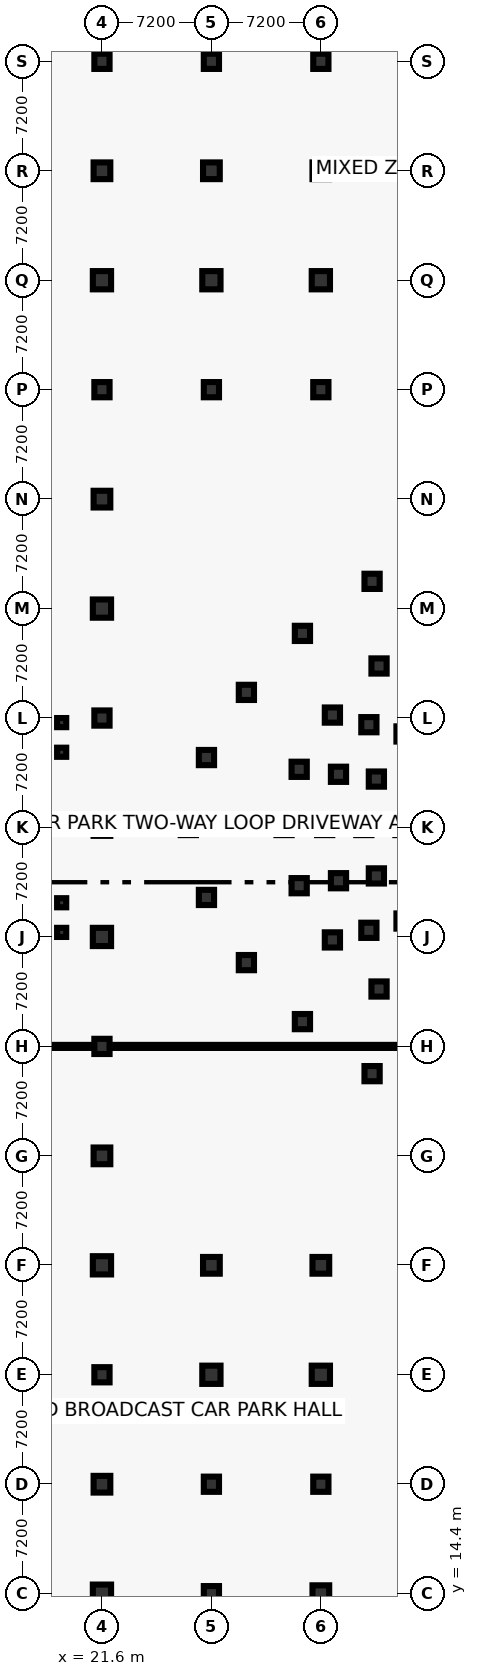
"""IFC4 building model, lengths in metres.
Left out: names, types, materials, properties, quantities, classifications, styles, units other than length and angle.
Written with IfcOpenShell. Run it as: python <this file> out.ifc"""

import sys

from ifc_helpers import new_model, si_unit, direction, frame, frame_2d, origin, origin_2d, place, context, subcontext, project, spatial, rectangle, circle, extrude, element, save


model = new_model("IFC4")
c1 = context("Model", 3, precision=1e-05, world=origin(), true_north=direction((0.0, 1.0)))
c2 = subcontext(c1, "Body", "Model", "MODEL_VIEW")
j1 = project(units=[si_unit("LENGTHUNIT", "METRE"), si_unit("PLANEANGLEUNIT", "RADIAN")], contexts=[c1])
p1 = place(None, origin())
s1 = spatial("IfcSite", under=j1, at=p1, CompositionType="ELEMENT")
p2 = place(p1, origin())
s2 = spatial("IfcBuilding", under=s1, at=p2, CompositionType="ELEMENT")
p3 = place(p2, frame((0.0, 0.0, -5.4)))
s3 = spatial("IfcBuildingStorey", under=s2, at=p3, CompositionType="ELEMENT", Elevation=-5.4)
p4 = place(p3, frame((21.6, 14.4, 0.0), z_axis=(0.0, 0.0, 1.0), x_axis=(1.0, 0.0, 0.0)))
e1 = element("IfcColumn", 1, at=p4, inside=s3, PredefinedType="COLUMN", context=c2, shape_type="SweptSolid", body=[
    extrude(circle(Radius=0.6, at=origin_2d()), origin(), (0.0, 0.0, 1.0), 5.4),
])
p5 = place(p3, frame((21.6, 21.6, 0.0), z_axis=(0.0, 0.0, 1.0), x_axis=(1.0, 0.0, 0.0)))
e2 = element("IfcColumn", 2, at=p5, inside=s3, PredefinedType="COLUMN", context=c2, shape_type="SweptSolid", body=[
    extrude(rectangle(XDim=1.1, YDim=1.1, at=origin_2d()), origin(), (0.0, 0.0, 1.0), 5.4),
])
p6 = place(p3, frame((21.6, 28.8, 0.0), z_axis=(0.0, 0.0, 1.0), x_axis=(1.0, 0.0, 0.0)))
e3 = element("IfcColumn", 3, at=p6, inside=s3, PredefinedType="COLUMN", context=c2, shape_type="SweptSolid", body=[
    extrude(rectangle(XDim=1.0, YDim=1.0, at=origin_2d()), origin(), (0.0, 0.0, 1.0), 5.4),
])
p7 = place(p3, frame((21.6, 36.0, 0.0), z_axis=(0.0, 0.0, 1.0), x_axis=(1.0, 0.0, 0.0)))
e4 = element("IfcColumn", 4, at=p7, inside=s3, PredefinedType="COLUMN", context=c2, shape_type="SweptSolid", body=[
    extrude(circle(Radius=0.6, at=origin_2d()), origin(), (0.0, 0.0, 1.0), 5.4),
])
p8 = place(p3, frame((21.6, 43.2, 0.0), z_axis=(0.0, 0.0, 1.0), x_axis=(1.0, 0.0, 0.0)))
e5 = element("IfcColumn", 5, at=p8, inside=s3, PredefinedType="COLUMN", context=c2, shape_type="SweptSolid", body=[
    extrude(rectangle(XDim=1.1, YDim=1.1, at=origin_2d()), origin(), (0.0, 0.0, 1.0), 5.4),
])
p9 = place(p3, frame((21.6, 50.4, 0.0), z_axis=(0.0, 0.0, 1.0), x_axis=(1.0, 0.0, 0.0)))
e6 = element("IfcColumn", 6, at=p9, inside=s3, PredefinedType="COLUMN", context=c2, shape_type="SweptSolid", body=[
    extrude(rectangle(XDim=1.0, YDim=1.0, at=origin_2d()), origin(), (0.0, 0.0, 1.0), 5.4),
])
p10 = place(p3, frame((21.6, 57.6, 0.0), z_axis=(0.0, 0.0, 1.0), x_axis=(1.0, 0.0, 0.0)))
e7 = element("IfcColumn", 7, at=p10, inside=s3, PredefinedType="COLUMN", context=c2, shape_type="SweptSolid", body=[
    extrude(circle(Radius=0.6, at=origin_2d()), origin(), (0.0, 0.0, 1.0), 5.4),
])
p11 = place(p3, frame((21.6, 64.8, 0.0), z_axis=(0.0, 0.0, 1.0), x_axis=(1.0, 0.0, 0.0)))
e8 = element("IfcColumn", 8, at=p11, inside=s3, PredefinedType="COLUMN", context=c2, shape_type="SweptSolid", body=[
    extrude(rectangle(XDim=1.1, YDim=1.1, at=origin_2d()), origin(), (0.0, 0.0, 1.0), 5.4),
])
p12 = place(p3, frame((21.6, 72.0, 0.0), z_axis=(0.0, 0.0, 1.0), x_axis=(1.0, 0.0, 0.0)))
e9 = element("IfcColumn", 9, at=p12, inside=s3, PredefinedType="COLUMN", context=c2, shape_type="SweptSolid", body=[
    extrude(rectangle(XDim=1.0, YDim=1.0, at=origin_2d()), origin(), (0.0, 0.0, 1.0), 5.4),
])
p13 = place(p3, frame((21.6, 79.2, 0.0), z_axis=(0.0, 0.0, 1.0), x_axis=(1.0, 0.0, 0.0)))
e10 = element("IfcColumn", 10, at=p13, inside=s3, PredefinedType="COLUMN", context=c2, shape_type="SweptSolid", body=[
    extrude(circle(Radius=0.6, at=origin_2d()), origin(), (0.0, 0.0, 1.0), 5.4),
])
p14 = place(p3, frame((21.6, 86.4, 0.0), z_axis=(0.0, 0.0, 1.0), x_axis=(1.0, 0.0, 0.0)))
e11 = element("IfcColumn", 11, at=p14, inside=s3, PredefinedType="COLUMN", context=c2, shape_type="SweptSolid", body=[
    extrude(rectangle(XDim=1.1, YDim=1.1, at=origin_2d()), origin(), (0.0, 0.0, 1.0), 5.4),
])
p15 = place(p3, frame((21.6, 93.6, 0.0), z_axis=(0.0, 0.0, 1.0), x_axis=(1.0, 0.0, 0.0)))
e12 = element("IfcColumn", 12, at=p15, inside=s3, PredefinedType="COLUMN", context=c2, shape_type="SweptSolid", body=[
    extrude(rectangle(XDim=1.0, YDim=1.0, at=origin_2d()), origin(), (0.0, 0.0, 1.0), 5.4),
])
p16 = place(p3, frame((21.6, 100.8, 0.0), z_axis=(0.0, 0.0, 1.0), x_axis=(1.0, 0.0, 0.0)))
e13 = element("IfcColumn", 13, at=p16, inside=s3, PredefinedType="COLUMN", context=c2, shape_type="SweptSolid", body=[
    extrude(circle(Radius=0.6, at=origin_2d()), origin(), (0.0, 0.0, 1.0), 5.4),
])
p17 = place(p3, frame((21.6, 108.0, 0.0), z_axis=(0.0, 0.0, 1.0), x_axis=(1.0, 0.0, 0.0)))
e14 = element("IfcColumn", 14, at=p17, inside=s3, PredefinedType="COLUMN", context=c2, shape_type="SweptSolid", body=[
    extrude(rectangle(XDim=1.1, YDim=1.1, at=origin_2d()), origin(), (0.0, 0.0, 1.0), 5.4),
])
p18 = place(p3, frame((21.6, 115.2, 0.0), z_axis=(0.0, 0.0, 1.0), x_axis=(1.0, 0.0, 0.0)))
e15 = element("IfcColumn", 15, at=p18, inside=s3, PredefinedType="COLUMN", context=c2, shape_type="SweptSolid", body=[
    extrude(rectangle(XDim=1.0, YDim=1.0, at=origin_2d()), origin(), (0.0, 0.0, 1.0), 5.4),
])
p19 = place(p3, frame((28.8, 14.4, 0.0), z_axis=(0.0, 0.0, 1.0), x_axis=(1.0, 0.0, 0.0)))
e16 = element("IfcColumn", 16, at=p19, inside=s3, PredefinedType="COLUMN", context=c2, shape_type="SweptSolid", body=[
    extrude(circle(Radius=0.5, at=origin_2d()), origin(), (0.0, 0.0, 1.0), 5.4),
])
p20 = place(p3, frame((28.8, 21.6, 0.0), z_axis=(0.0, 0.0, 1.0), x_axis=(1.0, 0.0, 0.0)))
e17 = element("IfcColumn", 17, at=p20, inside=s3, PredefinedType="COLUMN", context=c2, shape_type="SweptSolid", body=[
    extrude(rectangle(XDim=1.0, YDim=1.0, at=origin_2d()), origin(), (0.0, 0.0, 1.0), 5.4),
])
p21 = place(p3, frame((28.8, 28.8, 0.0), z_axis=(0.0, 0.0, 1.0), x_axis=(1.0, 0.0, 0.0)))
e18 = element("IfcColumn", 18, at=p21, inside=s3, PredefinedType="COLUMN", context=c2, shape_type="SweptSolid", body=[
    extrude(circle(Radius=0.6, at=origin_2d()), origin(), (0.0, 0.0, 1.0), 5.4),
])
p22 = place(p3, frame((28.8, 36.0, 0.0), z_axis=(0.0, 0.0, 1.0), x_axis=(1.0, 0.0, 0.0)))
e19 = element("IfcColumn", 19, at=p22, inside=s3, PredefinedType="COLUMN", context=c2, shape_type="SweptSolid", body=[
    extrude(rectangle(XDim=1.1, YDim=1.1, at=origin_2d()), origin(), (0.0, 0.0, 1.0), 5.4),
])
p23 = place(p3, frame((28.8, 93.6, 0.0), z_axis=(0.0, 0.0, 1.0), x_axis=(1.0, 0.0, 0.0)))
e20 = element("IfcColumn", 20, at=p23, inside=s3, PredefinedType="COLUMN", context=c2, shape_type="SweptSolid", body=[
    extrude(rectangle(XDim=1.0, YDim=1.0, at=origin_2d()), origin(), (0.0, 0.0, 1.0), 5.4),
])
p24 = place(p3, frame((28.8, 100.8, 0.0), z_axis=(0.0, 0.0, 1.0), x_axis=(1.0, 0.0, 0.0)))
e21 = element("IfcColumn", 21, at=p24, inside=s3, PredefinedType="COLUMN", context=c2, shape_type="SweptSolid", body=[
    extrude(circle(Radius=0.6, at=origin_2d()), origin(), (0.0, 0.0, 1.0), 5.4),
])
p25 = place(p3, frame((28.8, 108.0, 0.0), z_axis=(0.0, 0.0, 1.0), x_axis=(1.0, 0.0, 0.0)))
e22 = element("IfcColumn", 22, at=p25, inside=s3, PredefinedType="COLUMN", context=c2, shape_type="SweptSolid", body=[
    extrude(rectangle(XDim=1.1, YDim=1.1, at=origin_2d()), origin(), (0.0, 0.0, 1.0), 5.4),
])
p26 = place(p3, frame((28.8, 115.2, 0.0), z_axis=(0.0, 0.0, 1.0), x_axis=(1.0, 0.0, 0.0)))
e23 = element("IfcColumn", 23, at=p26, inside=s3, PredefinedType="COLUMN", context=c2, shape_type="SweptSolid", body=[
    extrude(circle(Radius=0.5, at=origin_2d()), origin(), (0.0, 0.0, 1.0), 5.4),
])
p27 = place(p3, frame((36.0, 14.4, 0.0), z_axis=(0.0, 0.0, 1.0), x_axis=(1.0, 0.0, 0.0)))
e24 = element("IfcColumn", 24, at=p27, inside=s3, PredefinedType="COLUMN", context=c2, shape_type="SweptSolid", body=[
    extrude(rectangle(XDim=1.1, YDim=1.1, at=origin_2d()), origin(), (0.0, 0.0, 1.0), 5.4),
])
p28 = place(p3, frame((36.0, 21.6, 0.0), z_axis=(0.0, 0.0, 1.0), x_axis=(1.0, 0.0, 0.0)))
e25 = element("IfcColumn", 25, at=p28, inside=s3, PredefinedType="COLUMN", context=c2, shape_type="SweptSolid", body=[
    extrude(rectangle(XDim=1.0, YDim=1.0, at=origin_2d()), origin(), (0.0, 0.0, 1.0), 5.4),
])
p29 = place(p3, frame((36.0, 28.8, 0.0), z_axis=(0.0, 0.0, 1.0), x_axis=(1.0, 0.0, 0.0)))
e26 = element("IfcColumn", 26, at=p29, inside=s3, PredefinedType="COLUMN", context=c2, shape_type="SweptSolid", body=[
    extrude(circle(Radius=0.6, at=origin_2d()), origin(), (0.0, 0.0, 1.0), 5.4),
])
p30 = place(p3, frame((36.0, 36.0, 0.0), z_axis=(0.0, 0.0, 1.0), x_axis=(1.0, 0.0, 0.0)))
e27 = element("IfcColumn", 27, at=p30, inside=s3, PredefinedType="COLUMN", context=c2, shape_type="SweptSolid", body=[
    extrude(rectangle(XDim=1.1, YDim=1.1, at=origin_2d()), origin(), (0.0, 0.0, 1.0), 5.4),
])
p31 = place(p3, frame((36.0, 93.6, 0.0), z_axis=(0.0, 0.0, 1.0), x_axis=(1.0, 0.0, 0.0)))
e28 = element("IfcColumn", 28, at=p31, inside=s3, PredefinedType="COLUMN", context=c2, shape_type="SweptSolid", body=[
    extrude(rectangle(XDim=1.0, YDim=1.0, at=origin_2d()), origin(), (0.0, 0.0, 1.0), 5.4),
])
p32 = place(p3, frame((36.0, 100.8, 0.0), z_axis=(0.0, 0.0, 1.0), x_axis=(1.0, 0.0, 0.0)))
e29 = element("IfcColumn", 29, at=p32, inside=s3, PredefinedType="COLUMN", context=c2, shape_type="SweptSolid", body=[
    extrude(circle(Radius=0.6, at=origin_2d()), origin(), (0.0, 0.0, 1.0), 5.4),
])
p33 = place(p3, frame((36.0, 108.0, 0.0), z_axis=(0.0, 0.0, 1.0), x_axis=(1.0, 0.0, 0.0)))
e30 = element("IfcColumn", 30, at=p33, inside=s3, PredefinedType="COLUMN", context=c2, shape_type="SweptSolid", body=[
    extrude(rectangle(XDim=1.1, YDim=1.1, at=origin_2d()), origin(), (0.0, 0.0, 1.0), 5.4),
])
p34 = place(p3, frame((36.0, 115.2, 0.0), z_axis=(0.0, 0.0, 1.0), x_axis=(1.0, 0.0, 0.0)))
e31 = element("IfcColumn", 31, at=p34, inside=s3, PredefinedType="COLUMN", context=c2, shape_type="SweptSolid", body=[
    extrude(rectangle(XDim=1.0, YDim=1.0, at=origin_2d()), origin(), (0.0, 0.0, 1.0), 5.4),
])
for number, where, z_axis, x_axis in (
    (32, (18.95, 57.9, 0.0), (0.0, 0.0, 1.0), (1.0, 0.0, 0.0)),
    (33, (18.95, 59.85, 0.0), (0.0, 0.0, 1.0), (1.0, 0.0, 0.0)),
    (34, (18.95, 69.75, 0.0), (0.0, 0.0, 1.0), (1.0, 0.0, 0.0)),
    (35, (18.95, 71.7, 0.0), (0.0, 0.0, 1.0), (1.0, 0.0, 0.0)),
):
    element("IfcColumn", number, at=place(p3, frame(where, z_axis=z_axis, x_axis=x_axis)), inside=s3, PredefinedType="COLUMN", context=c2, shape_type="SweptSolid", body=[
        extrude(rectangle(XDim=0.6, YDim=0.6, at=origin_2d()), origin(), (0.0, 0.0, 1.0), 5.4),
    ])
for number, where, z_axis, x_axis in (
    (36, (39.37, 80.992, 0.0), (0.0, 0.0, 1.0), (1.0, 0.0, 0.0)),
    (37, (39.828, 75.425, 0.0), (0.0, 0.0, 1.0), (1.0, 0.0, 0.0)),
    (38, (34.788, 77.569, 0.0), (0.0, 0.0, 1.0), (1.0, 0.0, 0.0)),
    (39, (41.472, 70.953, 0.0), (0.0, 0.0, 1.0), (1.0, 0.0, 0.0)),
    (40, (39.16, 71.562, 0.0), (0.0, 0.0, 1.0), (1.0, 0.0, 0.0)),
    (41, (39.653, 67.985, 0.0), (0.0, 0.0, 1.0), (1.0, 0.0, 0.0)),
    (42, (37.161, 68.301, 0.0), (0.0, 0.0, 1.0), (1.0, 0.0, 0.0)),
    (43, (36.76, 72.196, 0.0), (0.0, 0.0, 1.0), (1.0, 0.0, 0.0)),
    (44, (31.102, 73.688, 0.0), (0.0, 0.0, 1.0), (1.0, 0.0, 0.0)),
    (45, (34.574, 68.628, 0.0), (0.0, 0.0, 1.0), (1.0, 0.0, 0.0)),
    (46, (28.475, 69.401, 0.0), (0.0, 0.0, 1.0), (1.0, 0.0, 0.0)),
):
    element("IfcColumn", number, at=place(p3, frame(where, z_axis=z_axis, x_axis=x_axis)), inside=s3, PredefinedType="COLUMN", context=c2, shape_type="SweptSolid", body=[
        extrude(circle(Radius=0.5, at=origin_2d()), origin(), (0.0, 0.0, 1.0), 5.4),
    ])
p35 = place(p3, frame((41.4, 64.8, 0.0), z_axis=(0.0, 0.0, 1.0), x_axis=(1.0, 0.0, 0.0)))
e47 = element("IfcColumn", 47, at=p35, inside=s3, PredefinedType="COLUMN", context=c2, shape_type="SweptSolid", body=[
    extrude(circle(Radius=0.5, at=origin_2d()), origin(), (0.0, 0.0, 1.0), 5.16),
])
for number, where, z_axis, x_axis in (
    (48, (38.826, 64.8, 0.0), (0.0, 0.0, 1.0), (1.0, 0.0, 0.0)),
    (49, (36.252, 64.8, 0.0), (0.0, 0.0, 1.0), (1.0, 0.0, 0.0)),
    (50, (39.653, 61.615, 0.0), (0.0, 0.0, 1.0), (1.0, 0.0, 0.0)),
    (51, (37.161, 61.299, 0.0), (0.0, 0.0, 1.0), (1.0, 0.0, 0.0)),
    (52, (33.58, 64.8, 0.0), (0.0, 0.0, 1.0), (1.0, 0.0, 0.0)),
    (53, (27.28, 64.8, 0.0), (0.0, 0.0, 1.0), (1.0, 0.0, 0.0)),
    (54, (34.574, 60.972, 0.0), (0.0, 0.0, 1.0), (1.0, 0.0, 0.0)),
    (55, (28.475, 60.199, 0.0), (0.0, 0.0, 1.0), (1.0, 0.0, 0.0)),
    (56, (41.472, 58.647, 0.0), (0.0, 0.0, 1.0), (1.0, 0.0, 0.0)),
    (57, (39.16, 58.037, 0.0), (0.0, 0.0, 1.0), (1.0, 0.0, 0.0)),
    (58, (36.76, 57.404, 0.0), (0.0, 0.0, 1.0), (1.0, 0.0, 0.0)),
    (59, (31.102, 55.912, 0.0), (0.0, 0.0, 1.0), (1.0, 0.0, 0.0)),
    (60, (39.828, 54.175, 0.0), (0.0, 0.0, 1.0), (1.0, 0.0, 0.0)),
    (61, (34.788, 52.031, 0.0), (0.0, 0.0, 1.0), (1.0, 0.0, 0.0)),
    (62, (39.37, 48.608, 0.0), (0.0, 0.0, 1.0), (1.0, 0.0, 0.0)),
):
    element("IfcColumn", number, at=place(p3, frame(where, z_axis=z_axis, x_axis=x_axis)), inside=s3, PredefinedType="COLUMN", context=c2, shape_type="SweptSolid", body=[
        extrude(circle(Radius=0.5, at=origin_2d()), origin(), (0.0, 0.0, 1.0), 5.4),
    ])
p36 = place(p3, frame((42.0, 50.4, 0.0), z_axis=(0.0, 0.0, 1.0), x_axis=(-1.0, 0.0, 0.0)))
e63 = element("IfcWall", 63, at=p36, inside=s3, PredefinedType="PARTITIONING", context=c2, shape_type="SweptSolid", body=[
    extrude(rectangle(XDim=32.8, YDim=0.2, at=frame_2d((16.4, 0.0))), origin(), (0.0, 0.0, 1.0), 4.04),
])
save(model, sys.argv[1])
